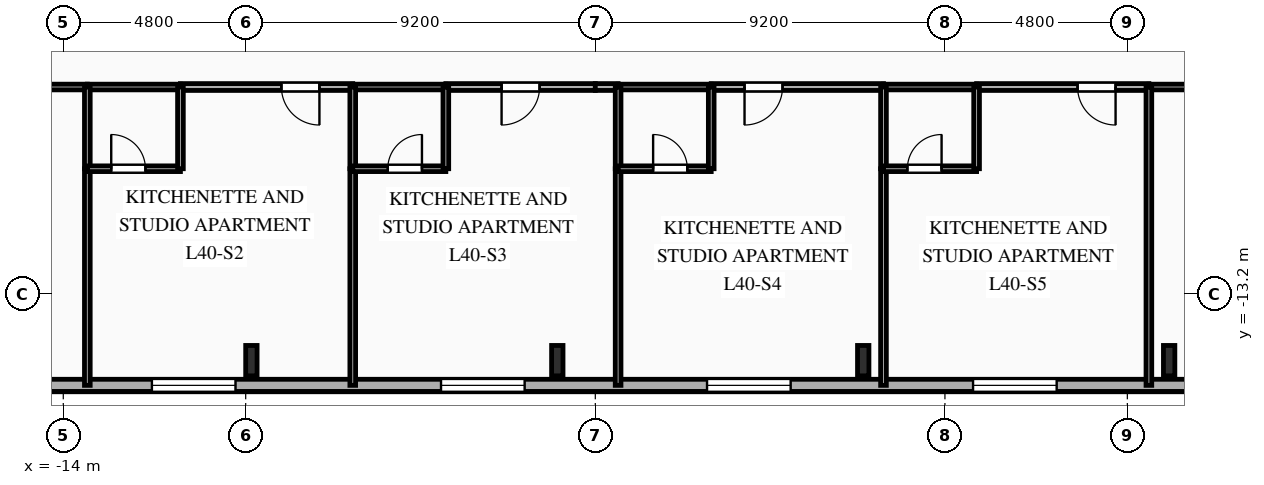
"""IFC4 building model, lengths in metres.
Left out: names, types, materials, properties, quantities, classifications, styles, units other than length and angle.
Written with IfcOpenShell. Run it as: python <this file> out.ifc"""

import sys

from ifc_helpers import new_model, si_unit, direction, frame, frame_2d, origin, origin_2d, place, context, subcontext, project, spatial, rectangle, i_section, extrude, element, fill, save


model = new_model("IFC4")
c1 = context("Model", 3, precision=1e-05, world=origin(), true_north=direction((0.0, 1.0)))
c2 = subcontext(c1, "Body", "Model", "MODEL_VIEW")
j1 = project(units=[si_unit("LENGTHUNIT", "METRE"), si_unit("PLANEANGLEUNIT", "RADIAN")], contexts=[c1])
p1 = place(None, origin())
s1 = spatial("IfcSite", under=j1, at=p1, CompositionType="ELEMENT")
p2 = place(p1, origin())
s2 = spatial("IfcBuilding", under=s1, at=p2, CompositionType="ELEMENT")
p3 = place(p2, frame((0.0, 0.0, 144.4)))
s3 = spatial("IfcBuildingStorey", under=s2, at=p3, CompositionType="ELEMENT", Elevation=144.4)
for number, where, z_axis, x_axis in (
    (1, (-9.05, -14.95, 0.0), (0.0, 0.0, 1.0), (1.0, 0.0, 0.0)),
    (2, (-1.0, -14.95, 0.0), (0.0, 0.0, 1.0), (1.0, 0.0, 0.0)),
    (3, (7.05, -14.95, 0.0), (0.0, 0.0, 1.0), (1.0, 0.0, 0.0)),
    (4, (15.1, -14.95, 0.0), (0.0, 0.0, 1.0), (1.0, 0.0, 0.0)),
):
    element("IfcColumn", number, at=place(p3, frame(where, z_axis=z_axis, x_axis=x_axis)), inside=s3, PredefinedType="COLUMN", context=c2, shape_type="SweptSolid", body=[
        extrude(i_section(OverallWidth=0.3, OverallDepth=0.8, WebThickness=0.018, FlangeThickness=0.033, FilletRadius=0.03, at=origin_2d()), origin(), (0.0, 0.0, 1.0), 3.35),
    ])
p4 = place(p3, frame((23.8, -15.6, 0.0), z_axis=(0.0, 0.0, 1.0), x_axis=(-1.0, 0.0, 0.0)))
e5 = element("IfcWall", 5, at=p4, inside=s3, PredefinedType="SOLIDWALL", context=c2, shape_type="SweptSolid", body=[
    extrude(rectangle(XDim=49.6, YDim=0.32, at=frame_2d((24.8, 0.0))), origin(), (0.0, 0.0, 1.0), 3.04),
])
p5 = place(p4, frame((1.13, 0.0, 0.85)))
e6 = element("IfcOpeningElement", 6, at=p5, cuts=e5, PredefinedType="OPENING", context=c2, shape_type="SweptSolid", body=[
    extrude(rectangle(XDim=1.1, YDim=1.85, at=frame_2d((0.55, 0.925))), frame((0.0, 0.17, 0.0), z_axis=(0.0, -1.0, 0.0), x_axis=(1.0, 0.0, 0.0)), (0.0, 0.0, 1.0), 0.34),
])
p6 = place(p4, frame((5.255, 0.0, 0.85)))
e7 = element("IfcOpeningElement", 7, at=p6, cuts=e5, PredefinedType="OPENING", context=c2, shape_type="SweptSolid", body=[
    extrude(rectangle(XDim=1.65, YDim=1.85, at=frame_2d((0.825, 0.925))), frame((0.0, 0.17, 0.0), z_axis=(0.0, -1.0, 0.0), x_axis=(1.0, 0.0, 0.0)), (0.0, 0.0, 1.0), 0.34),
])
p7 = place(p4, frame((11.66, 0.0, 0.85)))
e8 = element("IfcOpeningElement", 8, at=p7, cuts=e5, PredefinedType="OPENING", context=c2, shape_type="SweptSolid", body=[
    extrude(rectangle(XDim=2.2, YDim=1.85, at=frame_2d((1.1, 0.925))), frame((0.0, 0.17, 0.0), z_axis=(0.0, -1.0, 0.0), x_axis=(1.0, 0.0, 0.0)), (0.0, 0.0, 1.0), 0.34),
])
p8 = place(p4, frame((18.66, 0.0, 0.85)))
e9 = element("IfcOpeningElement", 9, at=p8, cuts=e5, PredefinedType="OPENING", context=c2, shape_type="SweptSolid", body=[
    extrude(rectangle(XDim=2.2, YDim=1.85, at=frame_2d((1.1, 0.925))), frame((0.0, 0.17, 0.0), z_axis=(0.0, -1.0, 0.0), x_axis=(1.0, 0.0, 0.0)), (0.0, 0.0, 1.0), 0.34),
])
p9 = place(p4, frame((25.66, 0.0, 0.85)))
e10 = element("IfcOpeningElement", 10, at=p9, cuts=e5, PredefinedType="OPENING", context=c2, shape_type="SweptSolid", body=[
    extrude(rectangle(XDim=2.2, YDim=1.85, at=frame_2d((1.1, 0.925))), frame((0.0, 0.17, 0.0), z_axis=(0.0, -1.0, 0.0), x_axis=(1.0, 0.0, 0.0)), (0.0, 0.0, 1.0), 0.34),
])
p10 = place(p4, frame((33.268, 0.0, 0.85)))
e11 = element("IfcOpeningElement", 11, at=p10, cuts=e5, PredefinedType="OPENING", context=c2, shape_type="SweptSolid", body=[
    extrude(rectangle(XDim=2.2, YDim=1.85, at=frame_2d((1.1, 0.925))), frame((0.0, 0.17, 0.0), z_axis=(0.0, -1.0, 0.0), x_axis=(1.0, 0.0, 0.0)), (0.0, 0.0, 1.0), 0.34),
])
p11 = place(p4, frame((38.913, 0.0, 0.85)))
e12 = element("IfcOpeningElement", 12, at=p11, cuts=e5, PredefinedType="OPENING", context=c2, shape_type="SweptSolid", body=[
    extrude(rectangle(XDim=1.65, YDim=1.85, at=frame_2d((0.825, 0.925))), frame((0.0, 0.17, 0.0), z_axis=(0.0, -1.0, 0.0), x_axis=(1.0, 0.0, 0.0)), (0.0, 0.0, 1.0), 0.34),
])
p12 = place(p4, frame((45.895, 0.0, 0.85)))
e13 = element("IfcOpeningElement", 13, at=p12, cuts=e5, PredefinedType="OPENING", context=c2, shape_type="SweptSolid", body=[
    extrude(rectangle(XDim=1.65, YDim=1.85, at=frame_2d((0.825, 0.925))), frame((0.0, 0.17, 0.0), z_axis=(0.0, -1.0, 0.0), x_axis=(1.0, 0.0, 0.0)), (0.0, 0.0, 1.0), 0.34),
])
p13 = place(p3, frame((-13.367, -7.75, 0.0), z_axis=(0.0, 0.0, 1.0), x_axis=(-1.0, 0.0, 0.0)))
e14 = element("IfcWall", 14, at=p13, inside=s3, PredefinedType="PARTITIONING", context=c2, shape_type="SweptSolid", body=[
    extrude(rectangle(XDim=7.583, YDim=0.15, at=frame_2d((3.792, 0.0))), origin(), (0.0, 0.0, 1.0), 3.04),
])
p14 = place(p13, frame((1.252, 0.0, 0.0)))
e15 = element("IfcOpeningElement", 15, at=p14, cuts=e14, PredefinedType="OPENING", context=c2, shape_type="SweptSolid", body=[
    extrude(rectangle(XDim=1.05, YDim=2.15, at=frame_2d((0.525, 1.075))), frame((0.0, 0.085, 0.0), z_axis=(0.0, -1.0, 0.0), x_axis=(1.0, 0.0, 0.0)), (0.0, 0.0, 1.0), 0.17),
])
p15 = place(p3, frame((-6.383, -7.75, 0.0), z_axis=(0.0, 0.0, 1.0), x_axis=(-1.0, 0.0, 0.0)))
e16 = element("IfcWall", 16, at=p15, inside=s3, PredefinedType="PARTITIONING", context=c2, shape_type="SweptSolid", body=[
    extrude(rectangle(XDim=4.534, YDim=0.18, at=frame_2d((2.267, 0.0))), origin(), (0.0, 0.0, 1.0), 3.04),
])
p16 = place(p15, frame((0.877, 0.0, 0.0)))
e17 = element("IfcOpeningElement", 17, at=p16, cuts=e16, PredefinedType="OPENING", context=c2, shape_type="SweptSolid", body=[
    extrude(rectangle(XDim=1.0, YDim=2.15, at=frame_2d((0.5, 1.075))), frame((0.0, 0.1, 0.0), z_axis=(0.0, -1.0, 0.0), x_axis=(1.0, 0.0, 0.0)), (0.0, 0.0, 1.0), 0.2),
])
p17 = place(p3, frame((-10.917, -7.75, 0.0), z_axis=(0.0, 0.0, 1.0), x_axis=(-1.0, 0.0, 0.0)))
e18 = element("IfcWall", 18, at=p17, inside=s3, PredefinedType="PLUMBINGWALL", context=c2, shape_type="SweptSolid", body=[
    extrude(rectangle(XDim=2.45, YDim=0.15, at=frame_2d((1.225, 0.0))), origin(), (0.0, 0.0, 1.0), 3.04),
])
p18 = place(p3, frame((0.0, -7.75, 0.0), z_axis=(0.0, 0.0, 1.0), x_axis=(-1.0, 0.0, 0.0)))
e19 = element("IfcWall", 19, at=p18, inside=s3, PredefinedType="PARTITIONING", context=c2, shape_type="SweptSolid", body=[
    extrude(rectangle(XDim=3.933, YDim=0.18, at=frame_2d((1.967, 0.0))), origin(), (0.0, 0.0, 1.0), 3.04),
])
p19 = place(p18, frame((1.467, 0.0, 0.0)))
e20 = element("IfcOpeningElement", 20, at=p19, cuts=e19, PredefinedType="OPENING", context=c2, shape_type="SweptSolid", body=[
    extrude(rectangle(XDim=1.0, YDim=2.15, at=frame_2d((0.5, 1.075))), frame((0.0, 0.1, 0.0), z_axis=(0.0, -1.0, 0.0), x_axis=(1.0, 0.0, 0.0)), (0.0, 0.0, 1.0), 0.2),
])
p20 = place(p3, frame((-3.933, -7.75, 0.0), z_axis=(0.0, 0.0, 1.0), x_axis=(-1.0, 0.0, 0.0)))
e21 = element("IfcWall", 21, at=p20, inside=s3, PredefinedType="PLUMBINGWALL", context=c2, shape_type="SweptSolid", body=[
    extrude(rectangle(XDim=2.45, YDim=0.15, at=frame_2d((1.225, 0.0))), origin(), (0.0, 0.0, 1.0), 3.04),
])
p21 = place(p3, frame((0.6, -7.75, 0.0), z_axis=(0.0, 0.0, 1.0), x_axis=(-1.0, 0.0, 0.0)))
e22 = element("IfcWall", 22, at=p21, inside=s3, PredefinedType="PARTITIONING", context=c2, shape_type="SweptSolid", body=[
    extrude(rectangle(XDim=0.6, YDim=0.18, at=frame_2d((0.3, 0.0))), origin(), (0.0, 0.0, 1.0), 3.04),
])
p22 = place(p3, frame((7.583, -7.75, 0.0), z_axis=(0.0, 0.0, 1.0), x_axis=(-1.0, 0.0, 0.0)))
e23 = element("IfcWall", 23, at=p22, inside=s3, PredefinedType="PARTITIONING", context=c2, shape_type="SweptSolid", body=[
    extrude(rectangle(XDim=4.533, YDim=0.18, at=frame_2d((2.267, 0.0))), origin(), (0.0, 0.0, 1.0), 3.04),
])
p23 = place(p22, frame((2.656, 0.0, 0.0)))
e24 = element("IfcOpeningElement", 24, at=p23, cuts=e23, PredefinedType="OPENING", context=c2, shape_type="SweptSolid", body=[
    extrude(rectangle(XDim=1.0, YDim=2.15, at=frame_2d((0.5, 1.075))), frame((0.0, 0.1, 0.0), z_axis=(0.0, -1.0, 0.0), x_axis=(1.0, 0.0, 0.0)), (0.0, 0.0, 1.0), 0.2),
])
p24 = place(p3, frame((3.05, -7.75, 0.0), z_axis=(0.0, 0.0, 1.0), x_axis=(-1.0, 0.0, 0.0)))
e25 = element("IfcWall", 25, at=p24, inside=s3, PredefinedType="PLUMBINGWALL", context=c2, shape_type="SweptSolid", body=[
    extrude(rectangle(XDim=2.45, YDim=0.15, at=frame_2d((1.225, 0.0))), origin(), (0.0, 0.0, 1.0), 3.04),
])
p25 = place(p3, frame((14.567, -7.75, 0.0), z_axis=(0.0, 0.0, 1.0), x_axis=(-1.0, 0.0, 0.0)))
e26 = element("IfcWall", 26, at=p25, inside=s3, PredefinedType="PARTITIONING", context=c2, shape_type="SweptSolid", body=[
    extrude(rectangle(XDim=4.534, YDim=0.18, at=frame_2d((2.267, 0.0))), origin(), (0.0, 0.0, 1.0), 3.04),
])
p26 = place(p25, frame((0.877, 0.0, 0.0)))
e27 = element("IfcOpeningElement", 27, at=p26, cuts=e26, PredefinedType="OPENING", context=c2, shape_type="SweptSolid", body=[
    extrude(rectangle(XDim=1.0, YDim=2.15, at=frame_2d((0.5, 1.075))), frame((0.0, 0.1, 0.0), z_axis=(0.0, -1.0, 0.0), x_axis=(1.0, 0.0, 0.0)), (0.0, 0.0, 1.0), 0.2),
])
p27 = place(p3, frame((10.033, -7.75, 0.0), z_axis=(0.0, 0.0, 1.0), x_axis=(-1.0, 0.0, 0.0)))
e28 = element("IfcWall", 28, at=p27, inside=s3, PredefinedType="PLUMBINGWALL", context=c2, shape_type="SweptSolid", body=[
    extrude(rectangle(XDim=2.45, YDim=0.15, at=frame_2d((1.225, 0.0))), origin(), (0.0, 0.0, 1.0), 3.04),
])
p28 = place(p3, frame((20.95, -7.75, 0.0), z_axis=(0.0, 0.0, 1.0), x_axis=(-1.0, 0.0, 0.0)))
e29 = element("IfcWall", 29, at=p28, inside=s3, PredefinedType="PARTITIONING", context=c2, shape_type="SweptSolid", body=[
    extrude(rectangle(XDim=6.383, YDim=0.15, at=frame_2d((3.191, 0.0))), origin(), (0.0, 0.0, 1.0), 3.04),
])
p29 = place(p28, frame((4.231, 0.0, 0.0)))
e30 = element("IfcOpeningElement", 30, at=p29, cuts=e29, PredefinedType="OPENING", context=c2, shape_type="SweptSolid", body=[
    extrude(rectangle(XDim=1.05, YDim=2.15, at=frame_2d((0.525, 1.075))), frame((0.0, 0.085, 0.0), z_axis=(0.0, -1.0, 0.0), x_axis=(1.0, 0.0, 0.0)), (0.0, 0.0, 1.0), 0.17),
])
p30 = place(p3, frame((-13.367, -9.9, 0.0), z_axis=(0.0, 0.0, 1.0), x_axis=(0.0, -1.0, 0.0)))
e31 = element("IfcWall", 31, at=p30, inside=s3, PredefinedType="PARTITIONING", context=c2, shape_type="SweptSolid", body=[
    extrude(rectangle(XDim=5.7, YDim=0.15, at=frame_2d((2.85, 0.0))), origin(), (0.0, 0.0, 1.0), 3.04),
])
p31 = place(p3, frame((-13.367, -7.75, 0.0), z_axis=(0.0, 0.0, 1.0), x_axis=(0.0, -1.0, 0.0)))
e32 = element("IfcWall", 32, at=p31, inside=s3, PredefinedType="PLUMBINGWALL", context=c2, shape_type="SweptSolid", body=[
    extrude(rectangle(XDim=2.15, YDim=0.15, at=frame_2d((1.075, 0.0))), origin(), (0.0, 0.0, 1.0), 3.04),
])
p32 = place(p3, frame((-13.367, -9.9, 0.0), z_axis=(0.0, 0.0, 1.0), x_axis=(1.0, 0.0, 0.0)))
e33 = element("IfcWall", 33, at=p32, inside=s3, PredefinedType="PLUMBINGWALL", context=c2, shape_type="SweptSolid", body=[
    extrude(rectangle(XDim=2.45, YDim=0.15, at=frame_2d((1.225, 0.0))), origin(), (0.0, 0.0, 1.0), 3.04),
])
p33 = place(p32, frame((0.629, 0.0, 0.0)))
e34 = element("IfcOpeningElement", 34, at=p33, cuts=e33, PredefinedType="OPENING", context=c2, shape_type="SweptSolid", body=[
    extrude(rectangle(XDim=0.9, YDim=2.1, at=frame_2d((0.45, 1.05))), frame((0.0, 0.085, 0.0), z_axis=(0.0, -1.0, 0.0), x_axis=(1.0, 0.0, 0.0)), (0.0, 0.0, 1.0), 0.17),
])
p34 = place(p3, frame((-10.917, -9.9, 0.0), z_axis=(0.0, 0.0, 1.0), x_axis=(0.0, 1.0, 0.0)))
e35 = element("IfcWall", 35, at=p34, inside=s3, PredefinedType="PLUMBINGWALL", context=c2, shape_type="SweptSolid", body=[
    extrude(rectangle(XDim=2.15, YDim=0.15, at=frame_2d((1.075, 0.0))), origin(), (0.0, 0.0, 1.0), 3.04),
])
p35 = place(p3, frame((-6.383, -9.9, 0.0), z_axis=(0.0, 0.0, 1.0), x_axis=(0.0, -1.0, 0.0)))
e36 = element("IfcWall", 36, at=p35, inside=s3, PredefinedType="PARTITIONING", context=c2, shape_type="SweptSolid", body=[
    extrude(rectangle(XDim=5.7, YDim=0.15, at=frame_2d((2.85, 0.0))), origin(), (0.0, 0.0, 1.0), 3.04),
])
p36 = place(p3, frame((-6.383, -7.75, 0.0), z_axis=(0.0, 0.0, 1.0), x_axis=(0.0, -1.0, 0.0)))
e37 = element("IfcWall", 37, at=p36, inside=s3, PredefinedType="PLUMBINGWALL", context=c2, shape_type="SweptSolid", body=[
    extrude(rectangle(XDim=2.15, YDim=0.15, at=frame_2d((1.075, 0.0))), origin(), (0.0, 0.0, 1.0), 3.04),
])
p37 = place(p3, frame((-6.383, -9.9, 0.0), z_axis=(0.0, 0.0, 1.0), x_axis=(1.0, 0.0, 0.0)))
e38 = element("IfcWall", 38, at=p37, inside=s3, PredefinedType="PLUMBINGWALL", context=c2, shape_type="SweptSolid", body=[
    extrude(rectangle(XDim=2.45, YDim=0.15, at=frame_2d((1.225, 0.0))), origin(), (0.0, 0.0, 1.0), 3.04),
])
p38 = place(p37, frame((0.921, 0.0, 0.0)))
e39 = element("IfcOpeningElement", 39, at=p38, cuts=e38, PredefinedType="OPENING", context=c2, shape_type="SweptSolid", body=[
    extrude(rectangle(XDim=0.9, YDim=2.1, at=frame_2d((0.45, 1.05))), frame((0.0, 0.085, 0.0), z_axis=(0.0, -1.0, 0.0), x_axis=(1.0, 0.0, 0.0)), (0.0, 0.0, 1.0), 0.17),
])
p39 = place(p3, frame((-3.933, -9.9, 0.0), z_axis=(0.0, 0.0, 1.0), x_axis=(0.0, 1.0, 0.0)))
e40 = element("IfcWall", 40, at=p39, inside=s3, PredefinedType="PLUMBINGWALL", context=c2, shape_type="SweptSolid", body=[
    extrude(rectangle(XDim=2.15, YDim=0.15, at=frame_2d((1.075, 0.0))), origin(), (0.0, 0.0, 1.0), 3.04),
])
p40 = place(p3, frame((0.6, -9.9, 0.0), z_axis=(0.0, 0.0, 1.0), x_axis=(0.0, -1.0, 0.0)))
e41 = element("IfcWall", 41, at=p40, inside=s3, PredefinedType="PARTITIONING", context=c2, shape_type="SweptSolid", body=[
    extrude(rectangle(XDim=5.7, YDim=0.15, at=frame_2d((2.85, 0.0))), origin(), (0.0, 0.0, 1.0), 3.04),
])
p41 = place(p3, frame((0.6, -7.75, 0.0), z_axis=(0.0, 0.0, 1.0), x_axis=(0.0, -1.0, 0.0)))
e42 = element("IfcWall", 42, at=p41, inside=s3, PredefinedType="PLUMBINGWALL", context=c2, shape_type="SweptSolid", body=[
    extrude(rectangle(XDim=2.15, YDim=0.15, at=frame_2d((1.075, 0.0))), origin(), (0.0, 0.0, 1.0), 3.04),
])
p42 = place(p3, frame((0.6, -9.9, 0.0), z_axis=(0.0, 0.0, 1.0), x_axis=(1.0, 0.0, 0.0)))
e43 = element("IfcWall", 43, at=p42, inside=s3, PredefinedType="PLUMBINGWALL", context=c2, shape_type="SweptSolid", body=[
    extrude(rectangle(XDim=2.45, YDim=0.15, at=frame_2d((1.225, 0.0))), origin(), (0.0, 0.0, 1.0), 3.04),
])
p43 = place(p42, frame((0.921, 0.0, 0.0)))
e44 = element("IfcOpeningElement", 44, at=p43, cuts=e43, PredefinedType="OPENING", context=c2, shape_type="SweptSolid", body=[
    extrude(rectangle(XDim=0.9, YDim=2.1, at=frame_2d((0.45, 1.05))), frame((0.0, 0.085, 0.0), z_axis=(0.0, -1.0, 0.0), x_axis=(1.0, 0.0, 0.0)), (0.0, 0.0, 1.0), 0.17),
])
p44 = place(p3, frame((3.05, -9.9, 0.0), z_axis=(0.0, 0.0, 1.0), x_axis=(0.0, 1.0, 0.0)))
e45 = element("IfcWall", 45, at=p44, inside=s3, PredefinedType="PLUMBINGWALL", context=c2, shape_type="SweptSolid", body=[
    extrude(rectangle(XDim=2.15, YDim=0.15, at=frame_2d((1.075, 0.0))), origin(), (0.0, 0.0, 1.0), 3.04),
])
p45 = place(p3, frame((7.583, -9.9, 0.0), z_axis=(0.0, 0.0, 1.0), x_axis=(0.0, -1.0, 0.0)))
e46 = element("IfcWall", 46, at=p45, inside=s3, PredefinedType="PARTITIONING", context=c2, shape_type="SweptSolid", body=[
    extrude(rectangle(XDim=5.7, YDim=0.15, at=frame_2d((2.85, 0.0))), origin(), (0.0, 0.0, 1.0), 2.525),
])
p46 = place(p3, frame((7.583, -7.75, 0.0), z_axis=(0.0, 0.0, 1.0), x_axis=(0.0, -1.0, 0.0)))
e47 = element("IfcWall", 47, at=p46, inside=s3, PredefinedType="PLUMBINGWALL", context=c2, shape_type="SweptSolid", body=[
    extrude(rectangle(XDim=2.15, YDim=0.15, at=frame_2d((1.075, 0.0))), origin(), (0.0, 0.0, 1.0), 3.04),
])
p47 = place(p3, frame((7.583, -9.9, 0.0), z_axis=(0.0, 0.0, 1.0), x_axis=(1.0, 0.0, 0.0)))
e48 = element("IfcWall", 48, at=p47, inside=s3, PredefinedType="PLUMBINGWALL", context=c2, shape_type="SweptSolid", body=[
    extrude(rectangle(XDim=2.45, YDim=0.15, at=frame_2d((1.225, 0.0))), origin(), (0.0, 0.0, 1.0), 3.04),
])
p48 = place(p47, frame((0.629, 0.0, 0.0)))
e49 = element("IfcOpeningElement", 49, at=p48, cuts=e48, PredefinedType="OPENING", context=c2, shape_type="SweptSolid", body=[
    extrude(rectangle(XDim=0.9, YDim=2.1, at=frame_2d((0.45, 1.05))), frame((0.0, 0.085, 0.0), z_axis=(0.0, -1.0, 0.0), x_axis=(1.0, 0.0, 0.0)), (0.0, 0.0, 1.0), 0.17),
])
p49 = place(p3, frame((10.033, -9.9, 0.0), z_axis=(0.0, 0.0, 1.0), x_axis=(0.0, 1.0, 0.0)))
e50 = element("IfcWall", 50, at=p49, inside=s3, PredefinedType="PLUMBINGWALL", context=c2, shape_type="SweptSolid", body=[
    extrude(rectangle(XDim=2.15, YDim=0.15, at=frame_2d((1.075, 0.0))), origin(), (0.0, 0.0, 1.0), 3.04),
])
p50 = place(p3, frame((14.567, -7.75, 0.0), z_axis=(0.0, 0.0, 1.0), x_axis=(0.0, -1.0, 0.0)))
e51 = element("IfcWall", 51, at=p50, inside=s3, PredefinedType="PARTITIONING", context=c2, shape_type="SweptSolid", body=[
    extrude(rectangle(XDim=7.85, YDim=0.15, at=frame_2d((3.925, 0.0))), origin(), (0.0, 0.0, 1.0), 3.04),
])
p51 = place(p7, origin())
e52 = element("IfcWindow", 52, at=p51, inside=s3, PartitioningType="SINGLE_PANEL", PredefinedType="WINDOW", context=c2, shape_type="SweptSolid", body=[
    extrude(rectangle(XDim=2.2, YDim=1.85, at=frame_2d((1.1, 0.925))), frame((0.0, 0.03, 0.0), z_axis=(0.0, -1.0, 0.0), x_axis=(1.0, 0.0, 0.0)), (0.0, 0.0, 1.0), 0.06),
])
fill(e8, e52)
p52 = place(p8, origin())
e53 = element("IfcWindow", 53, at=p52, inside=s3, PartitioningType="SINGLE_PANEL", PredefinedType="WINDOW", context=c2, shape_type="SweptSolid", body=[
    extrude(rectangle(XDim=2.2, YDim=1.85, at=frame_2d((1.1, 0.925))), frame((0.0, 0.03, 0.0), z_axis=(0.0, -1.0, 0.0), x_axis=(1.0, 0.0, 0.0)), (0.0, 0.0, 1.0), 0.06),
])
fill(e9, e53)
p53 = place(p9, origin())
e54 = element("IfcWindow", 54, at=p53, inside=s3, PartitioningType="SINGLE_PANEL", PredefinedType="WINDOW", context=c2, shape_type="SweptSolid", body=[
    extrude(rectangle(XDim=2.2, YDim=1.85, at=frame_2d((1.1, 0.925))), frame((0.0, 0.03, 0.0), z_axis=(0.0, -1.0, 0.0), x_axis=(1.0, 0.0, 0.0)), (0.0, 0.0, 1.0), 0.06),
])
fill(e10, e54)
p54 = place(p10, origin())
e55 = element("IfcWindow", 55, at=p54, inside=s3, PartitioningType="SINGLE_PANEL", PredefinedType="WINDOW", context=c2, shape_type="SweptSolid", body=[
    extrude(rectangle(XDim=2.2, YDim=1.85, at=frame_2d((1.1, 0.925))), frame((0.0, 0.03, 0.0), z_axis=(0.0, -1.0, 0.0), x_axis=(1.0, 0.0, 0.0)), (0.0, 0.0, 1.0), 0.06),
])
fill(e11, e55)
p55 = place(p16, origin())
e56 = element("IfcDoor", 56, at=p55, inside=s3, OperationType="SINGLE_SWING_LEFT", PredefinedType="DOOR", context=c2, shape_type="SweptSolid", body=[
    extrude(rectangle(XDim=1.0, YDim=2.15, at=frame_2d((0.5, 1.075))), frame((0.0, 0.025, 0.0), z_axis=(0.0, -1.0, 0.0), x_axis=(1.0, 0.0, 0.0)), (0.0, 0.0, 1.0), 0.05),
])
fill(e17, e56)
p56 = place(p19, origin())
e57 = element("IfcDoor", 57, at=p56, inside=s3, OperationType="SINGLE_SWING_RIGHT", PredefinedType="DOOR", context=c2, shape_type="SweptSolid", body=[
    extrude(rectangle(XDim=1.0, YDim=2.15, at=frame_2d((0.5, 1.075))), frame((0.0, 0.025, 0.0), z_axis=(0.0, -1.0, 0.0), x_axis=(1.0, 0.0, 0.0)), (0.0, 0.0, 1.0), 0.05),
])
fill(e20, e57)
p57 = place(p23, origin())
e58 = element("IfcDoor", 58, at=p57, inside=s3, OperationType="SINGLE_SWING_RIGHT", PredefinedType="DOOR", context=c2, shape_type="SweptSolid", body=[
    extrude(rectangle(XDim=1.0, YDim=2.15, at=frame_2d((0.5, 1.075))), frame((0.0, 0.025, 0.0), z_axis=(0.0, -1.0, 0.0), x_axis=(1.0, 0.0, 0.0)), (0.0, 0.0, 1.0), 0.05),
])
fill(e24, e58)
p58 = place(p26, origin())
e59 = element("IfcDoor", 59, at=p58, inside=s3, OperationType="SINGLE_SWING_LEFT", PredefinedType="DOOR", context=c2, shape_type="SweptSolid", body=[
    extrude(rectangle(XDim=1.0, YDim=2.15, at=frame_2d((0.5, 1.075))), frame((0.0, 0.025, 0.0), z_axis=(0.0, -1.0, 0.0), x_axis=(1.0, 0.0, 0.0)), (0.0, 0.0, 1.0), 0.05),
])
fill(e27, e59)
p59 = place(p33, origin())
e60 = element("IfcDoor", 60, at=p59, inside=s3, OperationType="SINGLE_SWING_LEFT", PredefinedType="DOOR", context=c2, shape_type="SweptSolid", body=[
    extrude(rectangle(XDim=0.9, YDim=2.1, at=frame_2d((0.45, 1.05))), frame((0.0, 0.025, 0.0), z_axis=(0.0, -1.0, 0.0), x_axis=(1.0, 0.0, 0.0)), (0.0, 0.0, 1.0), 0.05),
])
fill(e34, e60)
p60 = place(p38, origin())
e61 = element("IfcDoor", 61, at=p60, inside=s3, OperationType="SINGLE_SWING_RIGHT", PredefinedType="DOOR", context=c2, shape_type="SweptSolid", body=[
    extrude(rectangle(XDim=0.9, YDim=2.1, at=frame_2d((0.45, 1.05))), frame((0.0, 0.025, 0.0), z_axis=(0.0, -1.0, 0.0), x_axis=(1.0, 0.0, 0.0)), (0.0, 0.0, 1.0), 0.05),
])
fill(e39, e61)
p61 = place(p43, origin())
e62 = element("IfcDoor", 62, at=p61, inside=s3, OperationType="SINGLE_SWING_LEFT", PredefinedType="DOOR", context=c2, shape_type="SweptSolid", body=[
    extrude(rectangle(XDim=0.9, YDim=2.1, at=frame_2d((0.45, 1.05))), frame((0.0, 0.025, 0.0), z_axis=(0.0, -1.0, 0.0), x_axis=(1.0, 0.0, 0.0)), (0.0, 0.0, 1.0), 0.05),
])
fill(e44, e62)
p62 = place(p48, origin())
e63 = element("IfcDoor", 63, at=p62, inside=s3, OperationType="SINGLE_SWING_RIGHT", PredefinedType="DOOR", context=c2, shape_type="SweptSolid", body=[
    extrude(rectangle(XDim=0.9, YDim=2.1, at=frame_2d((0.45, 1.05))), frame((0.0, 0.025, 0.0), z_axis=(0.0, -1.0, 0.0), x_axis=(1.0, 0.0, 0.0)), (0.0, 0.0, 1.0), 0.05),
])
fill(e49, e63)
save(model, sys.argv[1])
